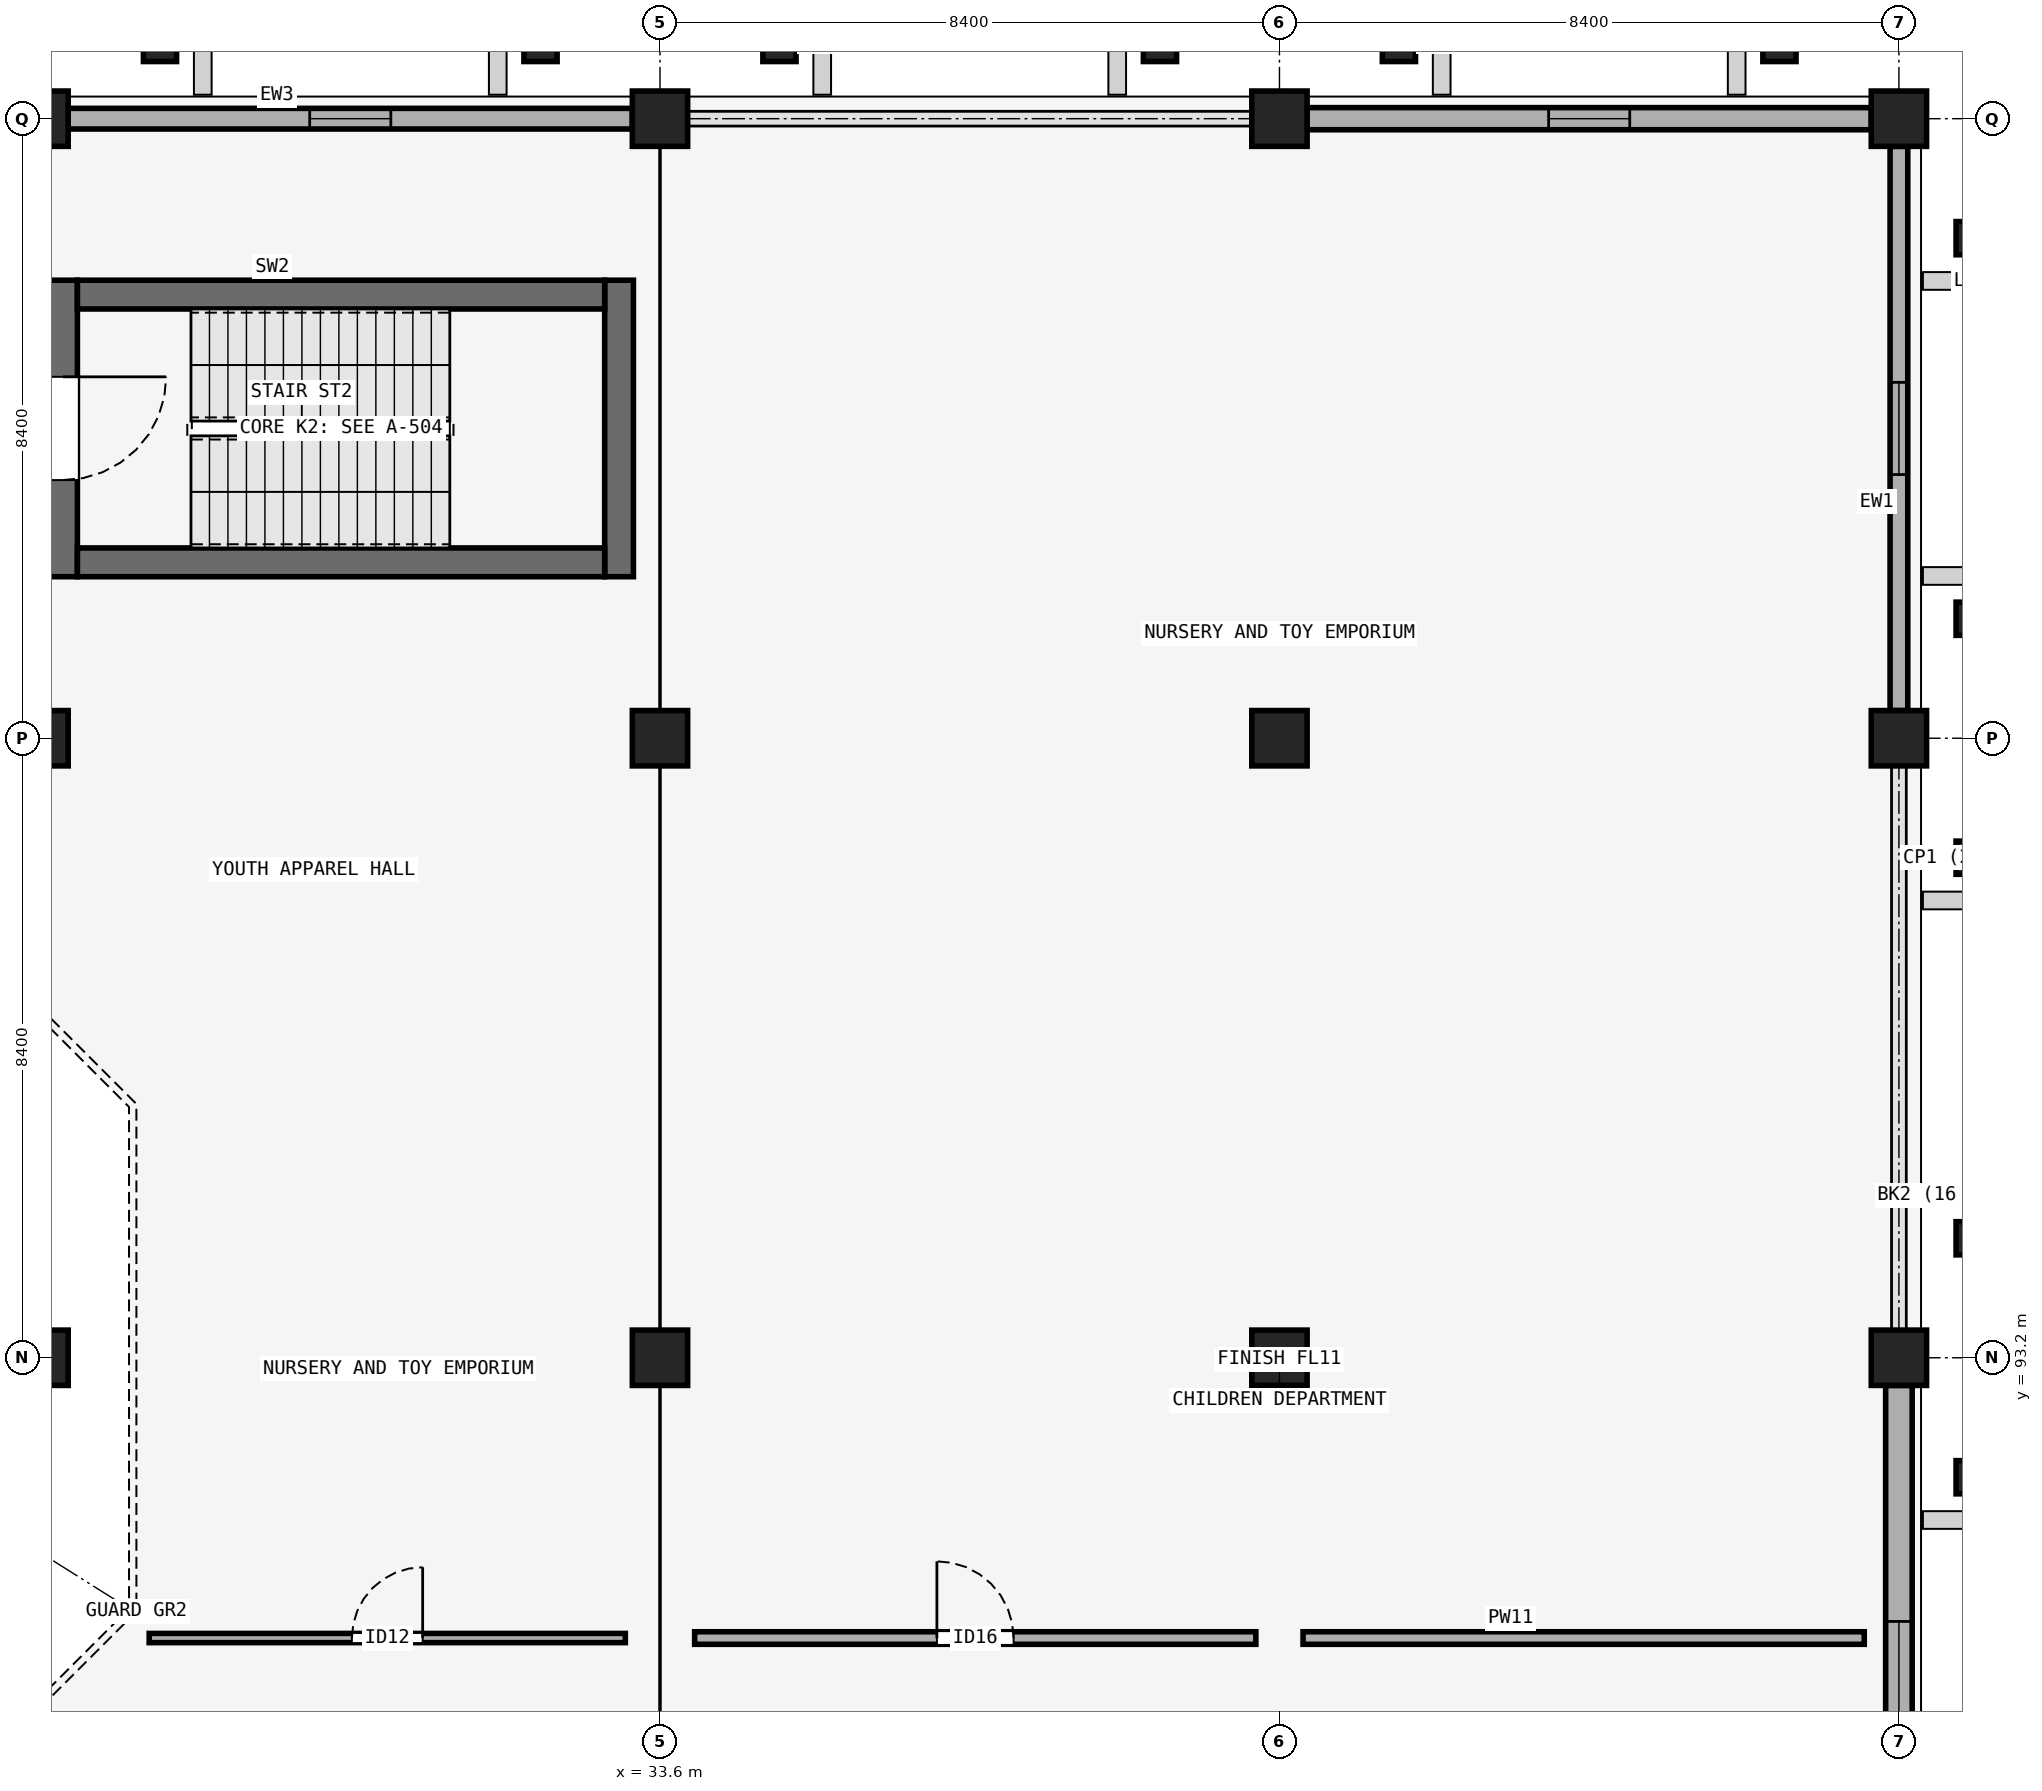
"""IFC4 building model, lengths in metres.
Left out: names, types, materials, properties, quantities, classifications, styles, units other than length and angle.
Written with IfcOpenShell. Run it as: python <this file> out.ifc"""

import sys

from ifc_helpers import new_model, si_unit, direction, frame, frame_2d, origin, origin_2d, place, context, subcontext, project, spatial, rectangle, extrude, element, fill, save


model = new_model("IFC4")
c1 = context("Model", 3, precision=1e-05, world=origin(), true_north=direction((0.0, 1.0)))
c2 = subcontext(c1, "Body", "Model", "MODEL_VIEW")
j1 = project(units=[si_unit("LENGTHUNIT", "METRE"), si_unit("PLANEANGLEUNIT", "RADIAN")], contexts=[c1])
p1 = place(None, origin())
s1 = spatial("IfcSite", under=j1, at=p1, CompositionType="ELEMENT")
p2 = place(p1, origin())
s2 = spatial("IfcBuilding", under=s1, at=p2, CompositionType="ELEMENT")
p3 = place(p2, frame((0.0, 0.0, 14.4)))
s3 = spatial("IfcBuildingStorey", under=s2, at=p3, CompositionType="ELEMENT", Elevation=14.4)
for number, where, z_axis, x_axis in (
    (1, (25.2, 93.2, 0.0), (0.0, 0.0, 1.0), (1.0, 0.0, 0.0)),
    (2, (33.6, 93.2, 0.0), (0.0, 0.0, 1.0), (1.0, 0.0, 0.0)),
    (3, (42.0, 93.2, 0.0), (0.0, 0.0, 1.0), (1.0, 0.0, 0.0)),
    (4, (50.4, 93.2, 0.0), (0.0, 0.0, 1.0), (1.0, 0.0, 0.0)),
    (5, (25.2, 101.6, 0.0), (0.0, 0.0, 1.0), (1.0, 0.0, 0.0)),
    (6, (33.6, 101.6, 0.0), (0.0, 0.0, 1.0), (1.0, 0.0, 0.0)),
    (7, (42.0, 101.6, 0.0), (0.0, 0.0, 1.0), (1.0, 0.0, 0.0)),
    (8, (50.4, 101.6, 0.0), (0.0, 0.0, 1.0), (1.0, 0.0, 0.0)),
    (9, (25.2, 110.0, 0.0), (0.0, 0.0, 1.0), (1.0, 0.0, 0.0)),
    (10, (33.6, 110.0, 0.0), (0.0, 0.0, 1.0), (1.0, 0.0, 0.0)),
    (11, (42.0, 110.0, 0.0), (0.0, 0.0, 1.0), (1.0, 0.0, 0.0)),
    (12, (50.4, 110.0, 0.0), (0.0, 0.0, 1.0), (1.0, 0.0, 0.0)),
):
    element("IfcColumn", number, at=place(p3, frame(where, z_axis=z_axis, x_axis=x_axis)), inside=s3, PredefinedType="COLUMN", context=c2, shape_type="SweptSolid", body=[
        extrude(rectangle(XDim=0.75, YDim=0.75, at=origin_2d()), origin(), (0.0, 0.0, 1.0), 4.5),
    ])
for number, where, z_axis, x_axis in (
    (13, (26.82, 111.05, 0.0), (0.0, 0.0, 1.0), (1.0, 0.0, 0.0)),
    (14, (31.98, 111.05, 0.0), (0.0, 0.0, 1.0), (1.0, 0.0, 0.0)),
    (15, (35.22, 111.05, 0.0), (0.0, 0.0, 1.0), (1.0, 0.0, 0.0)),
    (16, (40.38, 111.05, 0.0), (0.0, 0.0, 1.0), (1.0, 0.0, 0.0)),
    (17, (43.62, 111.05, 0.0), (0.0, 0.0, 1.0), (1.0, 0.0, 0.0)),
    (18, (48.78, 111.05, 0.0), (0.0, 0.0, 1.0), (1.0, 0.0, 0.0)),
    (19, (51.45, 91.58, 0.0), (0.0, 0.0, 1.0), (0.0, 1.0, 0.0)),
    (20, (51.45, 94.82, 0.0), (0.0, 0.0, 1.0), (0.0, 1.0, 0.0)),
    (21, (51.45, 99.98, 0.0), (0.0, 0.0, 1.0), (0.0, 1.0, 0.0)),
    (22, (51.45, 103.22, 0.0), (0.0, 0.0, 1.0), (0.0, 1.0, 0.0)),
    (23, (51.45, 108.38, 0.0), (0.0, 0.0, 1.0), (0.0, 1.0, 0.0)),
):
    element("IfcColumn", number, at=place(p3, frame(where, z_axis=z_axis, x_axis=x_axis)), inside=s3, PredefinedType="PILASTER", context=c2, shape_type="SweptSolid", body=[
        extrude(rectangle(XDim=0.45, YDim=0.55, at=origin_2d()), origin(), (0.0, 0.0, 1.0), 4.5),
    ])
p4 = place(p3, frame((25.575, 110.0, 0.0), z_axis=(0.0, 0.0, 1.0), x_axis=(1.0, 0.0, 0.0)))
e24 = element("IfcWall", 24, at=p4, inside=s3, PredefinedType="SOLIDWALL", context=c2, shape_type="SweptSolid", body=[
    extrude(rectangle(XDim=7.65, YDim=0.28, at=frame_2d((3.825, 0.0))), origin(), (0.0, 0.0, 1.0), 3.45),
])
p5 = place(p4, frame((3.275, 0.0, 0.95)))
e25 = element("IfcOpeningElement", 25, at=p5, cuts=e24, PredefinedType="OPENING", context=c2, shape_type="SweptSolid", body=[
    extrude(rectangle(XDim=1.1, YDim=1.85, at=frame_2d((0.55, 0.925))), frame((0.0, 0.15, 0.0), z_axis=(0.0, -1.0, 0.0), x_axis=(1.0, 0.0, 0.0)), (0.0, 0.0, 1.0), 0.3),
])
p6 = place(p3, frame((42.375, 110.0, 0.0), z_axis=(0.0, 0.0, 1.0), x_axis=(1.0, 0.0, 0.0)))
e26 = element("IfcWall", 26, at=p6, inside=s3, PredefinedType="SOLIDWALL", context=c2, shape_type="SweptSolid", body=[
    extrude(rectangle(XDim=7.65, YDim=0.3, at=frame_2d((3.825, 0.0))), origin(), (0.0, 0.0, 1.0), 3.45),
])
p7 = place(p6, frame((3.275, 0.0, 0.95)))
e27 = element("IfcOpeningElement", 27, at=p7, cuts=e26, PredefinedType="OPENING", context=c2, shape_type="SweptSolid", body=[
    extrude(rectangle(XDim=1.1, YDim=2.1, at=frame_2d((0.55, 1.05))), frame((0.0, 0.16, 0.0), z_axis=(0.0, -1.0, 0.0), x_axis=(1.0, 0.0, 0.0)), (0.0, 0.0, 1.0), 0.32),
])
p8 = place(p3, frame((50.4, 85.175, 0.0), z_axis=(0.0, 0.0, 1.0), x_axis=(0.0, 1.0, 0.0)))
e28 = element("IfcWall", 28, at=p8, inside=s3, PredefinedType="SOLIDWALL", context=c2, shape_type="SweptSolid", body=[
    extrude(rectangle(XDim=7.65, YDim=0.36, at=frame_2d((3.825, 0.0))), origin(), (0.0, 0.0, 1.0), 3.45),
])
p9 = place(p8, frame((3.2, 0.0, 0.95)))
e29 = element("IfcOpeningElement", 29, at=p9, cuts=e28, PredefinedType="OPENING", context=c2, shape_type="SweptSolid", body=[
    extrude(rectangle(XDim=1.25, YDim=1.85, at=frame_2d((0.625, 0.925))), frame((0.0, 0.19, 0.0), z_axis=(0.0, -1.0, 0.0), x_axis=(1.0, 0.0, 0.0)), (0.0, 0.0, 1.0), 0.38),
])
p10 = place(p3, frame((50.4, 101.975, 0.0), z_axis=(0.0, 0.0, 1.0), x_axis=(0.0, 1.0, 0.0)))
e30 = element("IfcWall", 30, at=p10, inside=s3, PredefinedType="SOLIDWALL", context=c2, shape_type="SweptSolid", body=[
    extrude(rectangle(XDim=7.65, YDim=0.24, at=frame_2d((3.825, 0.0))), origin(), (0.0, 0.0, 1.0), 3.45),
])
p11 = place(p10, frame((3.2, 0.0, 0.95)))
e31 = element("IfcOpeningElement", 31, at=p11, cuts=e30, PredefinedType="OPENING", context=c2, shape_type="SweptSolid", body=[
    extrude(rectangle(XDim=1.25, YDim=2.1, at=frame_2d((0.625, 1.05))), frame((0.0, 0.13, 0.0), z_axis=(0.0, -1.0, 0.0), x_axis=(1.0, 0.0, 0.0)), (0.0, 0.0, 1.0), 0.26),
])
p12 = place(p3, frame((25.505, 107.81, 0.0), z_axis=(0.0, 0.0, 1.0), x_axis=(0.0, -1.0, 0.0)))
e32 = element("IfcWall", 32, at=p12, inside=s3, PredefinedType="SHEAR", context=c2, shape_type="SweptSolid", body=[
    extrude(rectangle(XDim=4.02, YDim=0.39, at=frame_2d((2.01, 0.0))), origin(), (0.0, 0.0, 1.0), 4.2),
])
p13 = place(p12, frame((1.31, 0.0, 0.0)))
e33 = element("IfcOpeningElement", 33, at=p13, cuts=e32, PredefinedType="OPENING", context=c2, shape_type="SweptSolid", body=[
    extrude(rectangle(XDim=1.4, YDim=2.15, at=frame_2d((0.7, 1.075))), frame((0.0, 0.205, 0.0), z_axis=(0.0, -1.0, 0.0), x_axis=(1.0, 0.0, 0.0)), (0.0, 0.0, 1.0), 0.41),
])
p14 = place(p3, frame((33.045, 103.79, 0.0), z_axis=(0.0, 0.0, 1.0), x_axis=(0.0, 1.0, 0.0)))
e34 = element("IfcWall", 34, at=p14, inside=s3, PredefinedType="SHEAR", context=c2, shape_type="SweptSolid", body=[
    extrude(rectangle(XDim=4.02, YDim=0.39, at=frame_2d((2.01, 0.0))), origin(), (0.0, 0.0, 1.0), 4.2),
])
for number, where, z_axis, x_axis in (
    (35, (25.7, 103.985, 0.0), (0.0, 0.0, 1.0), (1.0, 0.0, 0.0)),
    (36, (25.7, 107.615, 0.0), (0.0, 0.0, 1.0), (1.0, 0.0, 0.0)),
):
    element("IfcWall", number, at=place(p3, frame(where, z_axis=z_axis, x_axis=x_axis)), inside=s3, PredefinedType="SHEAR", context=c2, shape_type="SweptSolid", body=[
        extrude(rectangle(XDim=7.15, YDim=0.39, at=frame_2d((3.575, 0.0))), origin(), (0.0, 0.0, 1.0), 4.2),
    ])
p15 = place(p3, frame((26.674, 89.4, 0.0), z_axis=(0.0, 0.0, 1.0), x_axis=(1.0, 0.0, 0.0)))
e37 = element("IfcWall", 37, at=p15, inside=s3, PredefinedType="PARTITIONING", context=c2, shape_type="SweptSolid", body=[
    extrude(rectangle(XDim=6.456, YDim=0.125, at=frame_2d((3.228, 0.0))), origin(), (0.0, 0.0, 1.0), 4.2),
])
p16 = place(p15, frame((2.748, 0.0, 0.0)))
e38 = element("IfcOpeningElement", 38, at=p16, cuts=e37, PredefinedType="OPENING", context=c2, shape_type="SweptSolid", body=[
    extrude(rectangle(XDim=0.96, YDim=2.22, at=frame_2d((0.48, 1.11))), frame((0.0, 0.073, 0.0), z_axis=(0.0, -1.0, 0.0), x_axis=(1.0, 0.0, 0.0)), (0.0, 0.0, 1.0), 0.145),
])
p17 = place(p3, frame((34.07, 89.4, 0.0), z_axis=(0.0, 0.0, 1.0), x_axis=(1.0, 0.0, 0.0)))
e39 = element("IfcWall", 39, at=p17, inside=s3, PredefinedType="PARTITIONING", context=c2, shape_type="SweptSolid", body=[
    extrude(rectangle(XDim=7.61, YDim=0.17, at=frame_2d((3.805, 0.0))), origin(), (0.0, 0.0, 1.0), 3.45),
])
p18 = place(p17, frame((3.285, 0.0, 0.0)))
e40 = element("IfcOpeningElement", 40, at=p18, cuts=e39, PredefinedType="OPENING", context=c2, shape_type="SweptSolid", body=[
    extrude(rectangle(XDim=1.04, YDim=2.22, at=frame_2d((0.52, 1.11))), frame((0.0, 0.095, 0.0), z_axis=(0.0, -1.0, 0.0), x_axis=(1.0, 0.0, 0.0)), (0.0, 0.0, 1.0), 0.19),
])
p19 = place(p3, frame((42.32, 89.4, 0.0), z_axis=(0.0, 0.0, 1.0), x_axis=(1.0, 0.0, 0.0)))
e41 = element("IfcWall", 41, at=p19, inside=s3, PredefinedType="PARTITIONING", context=c2, shape_type="SweptSolid", body=[
    extrude(rectangle(XDim=7.61, YDim=0.17, at=frame_2d((3.805, 0.0))), origin(), (0.0, 0.0, 1.0), 3.45),
])
p20 = place(p5, origin())
e42 = element("IfcWindow", 42, at=p20, inside=s3, PartitioningType="SINGLE_PANEL", PredefinedType="WINDOW", context=c2, shape_type="SweptSolid", body=[
    extrude(rectangle(XDim=1.1, YDim=1.85, at=frame_2d((0.55, 0.925))), frame((0.0, 0.03, 0.0), z_axis=(0.0, -1.0, 0.0), x_axis=(1.0, 0.0, 0.0)), (0.0, 0.0, 1.0), 0.06),
])
fill(e25, e42)
p21 = place(p7, origin())
e43 = element("IfcWindow", 43, at=p21, inside=s3, PartitioningType="SINGLE_PANEL", PredefinedType="WINDOW", context=c2, shape_type="SweptSolid", body=[
    extrude(rectangle(XDim=1.1, YDim=2.1, at=frame_2d((0.55, 1.05))), frame((0.0, 0.03, 0.0), z_axis=(0.0, -1.0, 0.0), x_axis=(1.0, 0.0, 0.0)), (0.0, 0.0, 1.0), 0.06),
])
fill(e27, e43)
p22 = place(p9, origin())
e44 = element("IfcWindow", 44, at=p22, inside=s3, PartitioningType="SINGLE_PANEL", PredefinedType="WINDOW", context=c2, shape_type="SweptSolid", body=[
    extrude(rectangle(XDim=1.25, YDim=1.85, at=frame_2d((0.625, 0.925))), frame((0.0, 0.03, 0.0), z_axis=(0.0, -1.0, 0.0), x_axis=(1.0, 0.0, 0.0)), (0.0, 0.0, 1.0), 0.06),
])
fill(e29, e44)
p23 = place(p11, origin())
e45 = element("IfcWindow", 45, at=p23, inside=s3, PartitioningType="SINGLE_PANEL", PredefinedType="WINDOW", context=c2, shape_type="SweptSolid", body=[
    extrude(rectangle(XDim=1.25, YDim=2.1, at=frame_2d((0.625, 1.05))), frame((0.0, 0.03, 0.0), z_axis=(0.0, -1.0, 0.0), x_axis=(1.0, 0.0, 0.0)), (0.0, 0.0, 1.0), 0.06),
])
fill(e31, e45)
p24 = place(p13, origin())
e46 = element("IfcDoor", 46, at=p24, inside=s3, OperationType="SINGLE_SWING_LEFT", PredefinedType="DOOR", context=c2, shape_type="SweptSolid", body=[
    extrude(rectangle(XDim=1.4, YDim=2.15, at=frame_2d((0.7, 1.075))), frame((0.0, 0.025, 0.0), z_axis=(0.0, -1.0, 0.0), x_axis=(1.0, 0.0, 0.0)), (0.0, 0.0, 1.0), 0.05),
])
fill(e33, e46)
p25 = place(p16, origin())
e47 = element("IfcDoor", 47, at=p25, inside=s3, OperationType="SINGLE_SWING_RIGHT", PredefinedType="DOOR", context=c2, shape_type="SweptSolid", body=[
    extrude(rectangle(XDim=0.96, YDim=2.22, at=frame_2d((0.48, 1.11))), frame((0.0, 0.025, 0.0), z_axis=(0.0, -1.0, 0.0), x_axis=(1.0, 0.0, 0.0)), (0.0, 0.0, 1.0), 0.05),
])
fill(e38, e47)
p26 = place(p18, origin())
e48 = element("IfcDoor", 48, at=p26, inside=s3, OperationType="SINGLE_SWING_LEFT", PredefinedType="DOOR", context=c2, shape_type="SweptSolid", body=[
    extrude(rectangle(XDim=1.04, YDim=2.22, at=frame_2d((0.52, 1.11))), frame((0.0, 0.025, 0.0), z_axis=(0.0, -1.0, 0.0), x_axis=(1.0, 0.0, 0.0)), (0.0, 0.0, 1.0), 0.05),
])
fill(e40, e48)
save(model, sys.argv[1])
